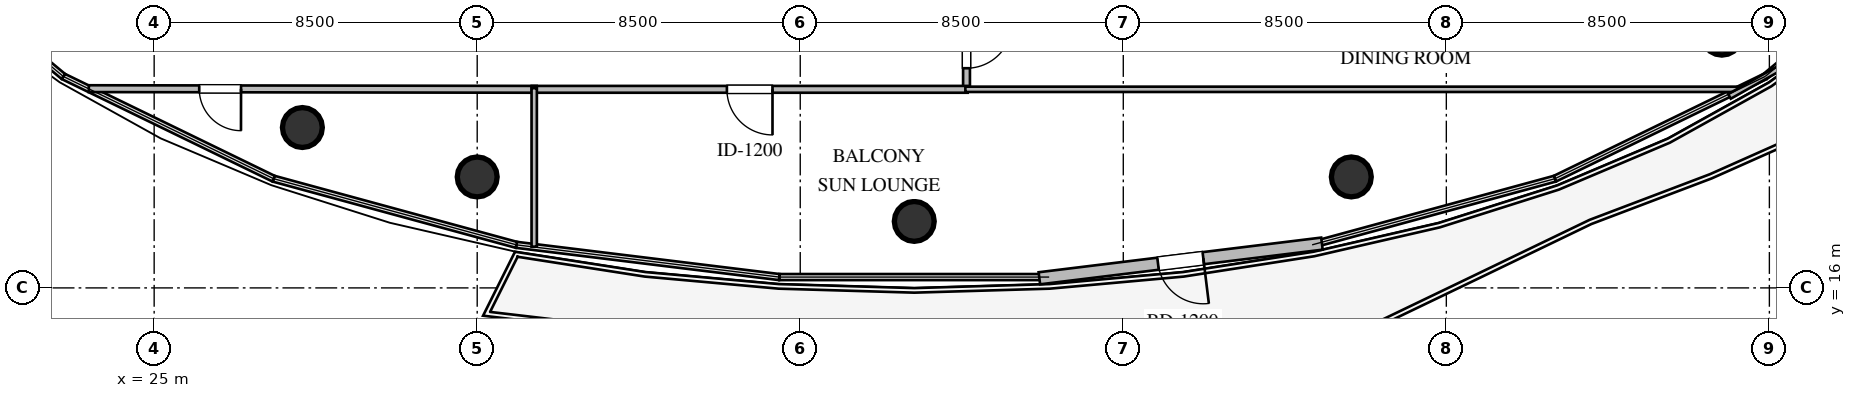
"""IFC4 building model, lengths in metres.
Left out: names, types, materials, properties, quantities, classifications, styles, units other than length and angle.
Written with IfcOpenShell. Run it as: python <this file> out.ifc"""

import sys

from ifc_helpers import new_model, si_unit, direction, frame, frame_2d, origin, origin_2d, place, context, subcontext, project, spatial, rectangle, circle, extrude, element, fill, save


model = new_model("IFC4")
c1 = context("Model", 3, precision=1e-05, world=origin(), true_north=direction((0.0, 1.0)))
c2 = subcontext(c1, "Body", "Model", "MODEL_VIEW")
j1 = project(units=[si_unit("LENGTHUNIT", "METRE"), si_unit("PLANEANGLEUNIT", "RADIAN")], contexts=[c1])
p1 = place(None, origin())
s1 = spatial("IfcSite", under=j1, at=p1, CompositionType="ELEMENT")
p2 = place(p1, origin())
s2 = spatial("IfcBuilding", under=s1, at=p2, CompositionType="ELEMENT")
p3 = place(p2, frame((0.0, 0.0, 217.2)))
s3 = spatial("IfcBuildingStorey", under=s2, at=p3, CompositionType="ELEMENT", Elevation=217.2)
for number, where, z_axis, x_axis in (
    (1, (28.9, 20.22, 0.0), (0.0, 0.0, 1.0), (1.0, 0.0, 0.0)),
    (2, (33.5, 18.92, 0.0), (0.0, 0.0, 1.0), (1.0, 0.0, 0.0)),
    (3, (45.0, 17.75, 0.0), (0.0, 0.0, 1.0), (1.0, 0.0, 0.0)),
    (4, (56.5, 18.92, 0.0), (0.0, 0.0, 1.0), (1.0, 0.0, 0.0)),
    (5, (66.25, 22.65, 0.0), (0.0, 0.0, 1.0), (1.0, 0.0, 0.0)),
):
    element("IfcColumn", number, at=place(p3, frame(where, z_axis=z_axis, x_axis=x_axis)), inside=s3, PredefinedType="COLUMN", context=c2, shape_type="SweptSolid", body=[
        extrude(circle(Radius=0.525, at=origin_2d()), origin(), (0.0, 0.0, 1.0), 3.6),
    ])
p4 = place(p3, frame((55.727, 17.165, 0.0), z_axis=(0.0, 0.0, 1.0), x_axis=(-0.992559081031, -0.121763995755, 0.0)))
e6 = element("IfcWall", 6, at=p4, inside=s3, PredefinedType="STANDARD", context=c2, shape_type="SweptSolid", body=[
    extrude(rectangle(XDim=7.491, YDim=0.32, at=frame_2d((3.745, 0.0))), origin(), (0.0, 0.0, 1.0), 3.36),
])
p5 = place(p4, frame((3.145, 0.0, 0.0)))
e7 = element("IfcOpeningElement", 7, at=p5, cuts=e6, PredefinedType="OPENING", context=c2, shape_type="SweptSolid", body=[
    extrude(rectangle(XDim=1.2, YDim=2.15, at=frame_2d((0.6, 1.075))), frame((0.0, 0.17, 0.0), z_axis=(0.0, -1.0, 0.0), x_axis=(1.0, 0.0, 0.0)), (0.0, 0.0, 1.0), 0.34),
])
p6 = place(p3, frame((46.375, 23.565, 0.0), z_axis=(0.0, 0.0, 1.0), x_axis=(0.0, -1.0, 0.0)))
e8 = element("IfcWall", 8, at=p6, inside=s3, PredefinedType="PARTITIONING", context=c2, shape_type="SweptSolid", body=[
    extrude(rectangle(XDim=2.37, YDim=0.18, at=frame_2d((1.185, 0.0))), origin(), (0.0, 0.0, 1.0), 3.36),
])
p7 = place(p6, frame((0.585, 0.0, 0.0)))
e9 = element("IfcOpeningElement", 9, at=p7, cuts=e8, PredefinedType="OPENING", context=c2, shape_type="SweptSolid", body=[
    extrude(rectangle(XDim=1.2, YDim=2.15, at=frame_2d((0.6, 1.075))), frame((0.0, 0.1, 0.0), z_axis=(0.0, -1.0, 0.0), x_axis=(1.0, 0.0, 0.0)), (0.0, 0.0, 1.0), 0.2),
])
p8 = place(p3, frame((35.065, 21.225, 0.0), z_axis=(0.0, 0.0, 1.0), x_axis=(-0.999998948453, 0.001450204611, 0.0)))
e10 = element("IfcWall", 10, at=p8, inside=s3, PredefinedType="PARTITIONING", context=c2, shape_type="SweptSolid", body=[
    extrude(rectangle(XDim=11.784, YDim=0.18, at=frame_2d((5.892, 0.0))), origin(), (0.0, 0.0, 1.0), 2.89),
])
p9 = place(p8, frame((7.779, 0.0, 0.0)))
e11 = element("IfcOpeningElement", 11, at=p9, cuts=e10, PredefinedType="OPENING", context=c2, shape_type="SweptSolid", body=[
    extrude(rectangle(XDim=1.1, YDim=2.1, at=frame_2d((0.55, 1.05))), frame((0.0, 0.1, 0.0), z_axis=(0.0, -1.0, 0.0), x_axis=(1.0, 0.0, 0.0)), (0.0, 0.0, 1.0), 0.2),
])
p10 = place(p3, frame((46.405, 21.225, 0.0), z_axis=(0.0, 0.0, 1.0), x_axis=(-1.0, 0.0, 0.0)))
e12 = element("IfcWall", 12, at=p10, inside=s3, PredefinedType="PARTITIONING", context=c2, shape_type="SweptSolid", body=[
    extrude(rectangle(XDim=11.47, YDim=0.18, at=frame_2d((5.735, 0.0))), origin(), (0.0, 0.0, 1.0), 2.996),
])
p11 = place(p10, frame((5.135, 0.0, 0.0)))
e13 = element("IfcOpeningElement", 13, at=p11, cuts=e12, PredefinedType="OPENING", context=c2, shape_type="SweptSolid", body=[
    extrude(rectangle(XDim=1.2, YDim=2.15, at=frame_2d((0.6, 1.075))), frame((0.0, 0.1, 0.0), z_axis=(0.0, -1.0, 0.0), x_axis=(1.0, 0.0, 0.0)), (0.0, 0.0, 1.0), 0.2),
])
p12 = place(p3, frame((66.684, 21.225, 0.0), z_axis=(0.0, 0.0, 1.0), x_axis=(-1.0, 0.0, 0.0)))
e14 = element("IfcWall", 14, at=p12, inside=s3, PredefinedType="PARTITIONING", context=c2, shape_type="SweptSolid", body=[
    extrude(rectangle(XDim=20.339, YDim=0.14, at=frame_2d((10.169, 0.0))), origin(), (0.0, 0.0, 1.0), 2.996),
])
p13 = place(p3, frame((67.748, 21.77, 0.0), z_axis=(0.0, 0.0, 1.0), x_axis=(-0.871352238731, -0.490658003153, 0.0)))
e15 = element("IfcWall", 15, at=p13, inside=s3, PredefinedType="PARTITIONING", context=c2, shape_type="SweptSolid", body=[
    extrude(rectangle(XDim=1.49, YDim=0.14, at=frame_2d((0.745, 0.0))), origin(), (0.0, 0.0, 1.0), 3.36),
])
p14 = place(p3, frame((35.0, 21.255, 0.0), z_axis=(0.0, 0.0, 1.0), x_axis=(0.0, -1.0, 0.0)))
e16 = element("IfcWall", 16, at=p14, inside=s3, PredefinedType="PARTITIONING", context=c2, shape_type="SweptSolid", body=[
    extrude(rectangle(XDim=4.169, YDim=0.14, at=frame_2d((2.085, 0.0))), origin(), (0.0, 0.0, 1.0), 3.36),
])
p15 = place(p5, origin())
e17 = element("IfcDoor", 17, at=p15, inside=s3, OperationType="SINGLE_SWING_LEFT", PredefinedType="DOOR", context=c2, shape_type="SweptSolid", body=[
    extrude(rectangle(XDim=1.2, YDim=2.15, at=frame_2d((0.6, 1.075))), frame((0.0, 0.025, 0.0), z_axis=(0.0, -1.0, 0.0), x_axis=(1.0, 0.0, 0.0)), (0.0, 0.0, 1.0), 0.05),
])
fill(e7, e17)
p16 = place(p7, origin())
e18 = element("IfcDoor", 18, at=p16, inside=s3, OperationType="SINGLE_SWING_LEFT", PredefinedType="DOOR", context=c2, shape_type="SweptSolid", body=[
    extrude(rectangle(XDim=1.2, YDim=2.15, at=frame_2d((0.6, 1.075))), frame((0.0, 0.025, 0.0), z_axis=(0.0, -1.0, 0.0), x_axis=(1.0, 0.0, 0.0)), (0.0, 0.0, 1.0), 0.05),
])
fill(e9, e18)
p17 = place(p9, origin())
e19 = element("IfcDoor", 19, at=p17, inside=s3, OperationType="SINGLE_SWING_LEFT", PredefinedType="DOOR", context=c2, shape_type="SweptSolid", body=[
    extrude(rectangle(XDim=1.1, YDim=2.1, at=frame_2d((0.55, 1.05))), frame((0.0, 0.025, 0.0), z_axis=(0.0, -1.0, 0.0), x_axis=(1.0, 0.0, 0.0)), (0.0, 0.0, 1.0), 0.05),
])
fill(e11, e19)
p18 = place(p11, origin())
e20 = element("IfcDoor", 20, at=p18, inside=s3, OperationType="SINGLE_SWING_LEFT", PredefinedType="DOOR", context=c2, shape_type="SweptSolid", body=[
    extrude(rectangle(XDim=1.2, YDim=2.15, at=frame_2d((0.6, 1.075))), frame((0.0, 0.025, 0.0), z_axis=(0.0, -1.0, 0.0), x_axis=(1.0, 0.0, 0.0)), (0.0, 0.0, 1.0), 0.05),
])
fill(e13, e20)
save(model, sys.argv[1])
